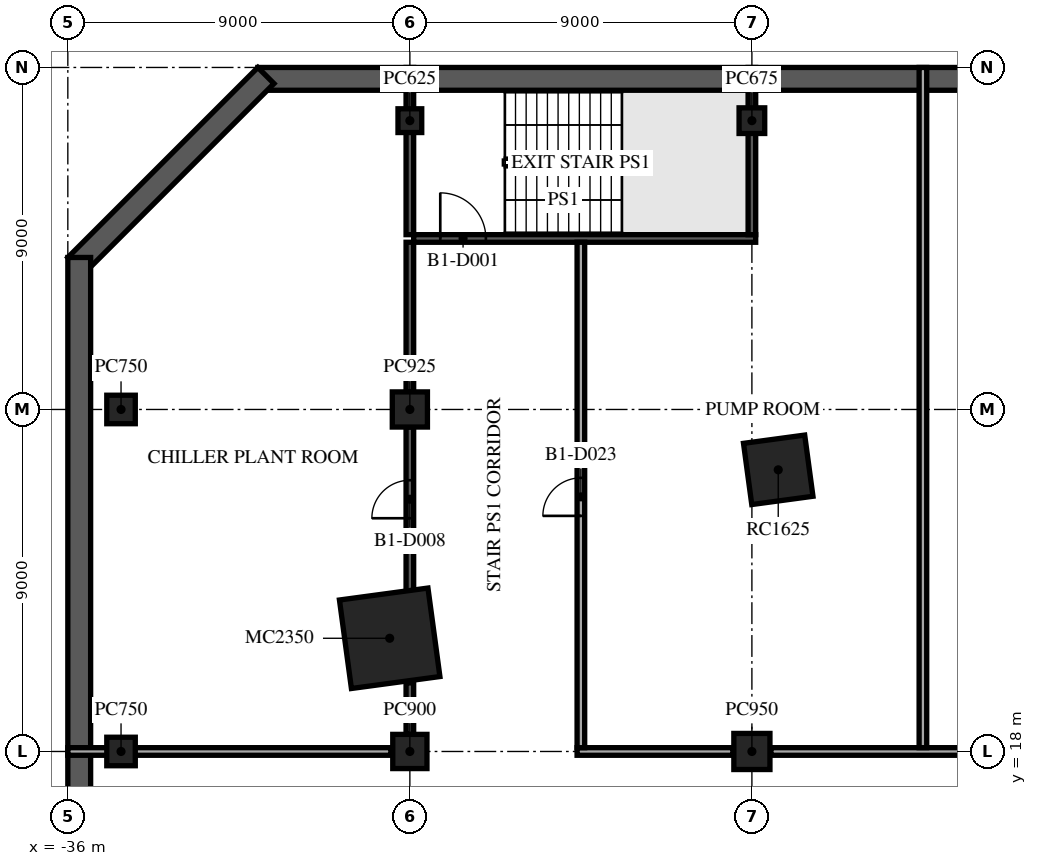
"""IFC4 building model, lengths in metres.
Left out: names, types, materials, properties, quantities, classifications, styles, units other than length and angle.
Written with IfcOpenShell. Run it as: python <this file> out.ifc"""

import sys

from ifc_helpers import new_model, si_unit, direction, frame, frame_2d, origin, origin_2d, place, context, subcontext, project, spatial, rectangle, extrude, element, fill, save


model = new_model("IFC4")
c1 = context("Model", 3, precision=1e-05, world=origin(), true_north=direction((0.0, 1.0)))
c2 = subcontext(c1, "Body", "Model", "MODEL_VIEW")
j1 = project(units=[si_unit("LENGTHUNIT", "METRE"), si_unit("PLANEANGLEUNIT", "RADIAN")], contexts=[c1])
p1 = place(None, origin())
s1 = spatial("IfcSite", under=j1, at=p1, CompositionType="ELEMENT")
p2 = place(p1, origin())
s2 = spatial("IfcBuilding", under=s1, at=p2, CompositionType="ELEMENT")
p3 = place(p2, frame((0.0, 0.0, -4.5)))
s3 = spatial("IfcBuildingStorey", under=s2, at=p3, CompositionType="ELEMENT", Elevation=-4.5)
p4 = place(p3, frame((31.0, 35.7, -0.3), z_axis=(0.0, 0.0, 1.0), x_axis=(-1.0, 0.0, 0.0)))
e1 = element("IfcWall", 1, at=p4, inside=s3, PredefinedType="SOLIDWALL", context=c2, shape_type="SweptSolid", body=[
    extrude(rectangle(XDim=62.0, YDim=0.6, at=frame_2d((31.0, 0.0))), origin(), (0.0, 0.0, 1.0), 4.4),
])
p5 = place(p3, frame((-30.788, 35.788, -0.3), z_axis=(0.0, 0.0, 1.0), x_axis=(-0.707106781187, -0.707106781187, 0.0)))
e2 = element("IfcWall", 2, at=p5, inside=s3, PredefinedType="SOLIDWALL", context=c2, shape_type="SweptSolid", body=[
    extrude(rectangle(XDim=7.071, YDim=0.6, at=frame_2d((3.536, 0.0))), origin(), (0.0, 0.0, 1.0), 4.4),
])
p6 = place(p3, frame((-35.7, 31.0, -0.3), z_axis=(0.0, 0.0, 1.0), x_axis=(0.0, -1.0, 0.0)))
e3 = element("IfcWall", 3, at=p6, inside=s3, PredefinedType="SOLIDWALL", context=c2, shape_type="SweptSolid", body=[
    extrude(rectangle(XDim=62.0, YDim=0.6, at=frame_2d((31.0, 0.0))), origin(), (0.0, 0.0, 1.0), 4.4),
])
for number, where, z_axis, x_axis in (
    (4, (-34.6, 18.0, 0.0), (0.0, 0.0, 1.0), (1.0, 0.0, 0.0)),
    (5, (-34.6, 27.0, 0.0), (0.0, 0.0, 1.0), (1.0, 0.0, 0.0)),
):
    element("IfcColumn", number, at=place(p3, frame(where, z_axis=z_axis, x_axis=x_axis)), inside=s3, PredefinedType="COLUMN", context=c2, shape_type="SweptSolid", body=[
        extrude(rectangle(XDim=0.75, YDim=0.75, at=origin_2d()), origin(), (0.0, 0.0, 1.0), 4.5),
    ])
p7 = place(p3, frame((-27.0, 18.0, 0.0), z_axis=(0.0, 0.0, 1.0), x_axis=(1.0, 0.0, 0.0)))
e6 = element("IfcColumn", 6, at=p7, inside=s3, PredefinedType="COLUMN", context=c2, shape_type="SweptSolid", body=[
    extrude(rectangle(XDim=0.9, YDim=0.9, at=origin_2d()), origin(), (0.0, 0.0, 1.0), 4.5),
])
p8 = place(p3, frame((-27.0, 27.0, 0.0), z_axis=(0.0, 0.0, 1.0), x_axis=(1.0, 0.0, 0.0)))
e7 = element("IfcColumn", 7, at=p8, inside=s3, PredefinedType="COLUMN", context=c2, shape_type="SweptSolid", body=[
    extrude(rectangle(XDim=0.925, YDim=0.925, at=origin_2d()), origin(), (0.0, 0.0, 1.0), 4.5),
])
p9 = place(p3, frame((-27.0, 34.6, 0.0), z_axis=(0.0, 0.0, 1.0), x_axis=(1.0, 0.0, 0.0)))
e8 = element("IfcColumn", 8, at=p9, inside=s3, PredefinedType="COLUMN", context=c2, shape_type="SweptSolid", body=[
    extrude(rectangle(XDim=0.625, YDim=0.625, at=origin_2d()), origin(), (0.0, 0.0, 1.0), 4.5),
])
p10 = place(p3, frame((-18.0, 18.0, 0.0), z_axis=(0.0, 0.0, 1.0), x_axis=(1.0, 0.0, 0.0)))
e9 = element("IfcColumn", 9, at=p10, inside=s3, PredefinedType="COLUMN", context=c2, shape_type="SweptSolid", body=[
    extrude(rectangle(XDim=0.95, YDim=0.95, at=origin_2d()), origin(), (0.0, 0.0, 1.0), 4.5),
])
p11 = place(p3, frame((-18.0, 34.6, 0.0), z_axis=(0.0, 0.0, 1.0), x_axis=(1.0, 0.0, 0.0)))
e10 = element("IfcColumn", 10, at=p11, inside=s3, PredefinedType="COLUMN", context=c2, shape_type="SweptSolid", body=[
    extrude(rectangle(XDim=0.675, YDim=0.675, at=origin_2d()), origin(), (0.0, 0.0, 1.0), 4.5),
])
p12 = place(p3, frame((-17.307, 25.412, 0.0), z_axis=(0.0, 0.0, 1.0), x_axis=(0.991001197216, 0.133853005627, 0.0)))
e11 = element("IfcColumn", 11, at=p12, inside=s3, PredefinedType="COLUMN", context=c2, shape_type="SweptSolid", body=[
    extrude(rectangle(XDim=1.625, YDim=1.625, at=origin_2d()), origin(), (0.0, 0.0, 1.0), 4.5),
])
p13 = place(p3, frame((-27.531, 20.979, 0.0), z_axis=(0.0, 0.0, 1.0), x_axis=(0.991001197216, 0.133853005627, 0.0)))
e12 = element("IfcColumn", 12, at=p13, inside=s3, PredefinedType="COLUMN", context=c2, shape_type="SweptSolid", body=[
    extrude(rectangle(XDim=2.35, YDim=2.35, at=origin_2d()), origin(), (0.0, 0.0, 1.0), 4.5),
])
p14 = place(p3, frame((-36.0, 18.0, 0.0), z_axis=(0.0, 0.0, 1.0), x_axis=(1.0, 0.0, 0.0)))
e13 = element("IfcWall", 13, at=p14, inside=s3, PredefinedType="PARTITIONING", context=c2, shape_type="SweptSolid", body=[
    extrude(rectangle(XDim=8.5, YDim=0.2, at=frame_2d((4.25, 0.0))), origin(), (0.0, 0.0, 1.0), 4.1),
])
p15 = place(p3, frame((-22.6, 18.0, 0.0), z_axis=(0.0, 0.0, 1.0), x_axis=(1.0, 0.0, 0.0)))
e14 = element("IfcWall", 14, at=p15, inside=s3, PredefinedType="PARTITIONING", context=c2, shape_type="SweptSolid", body=[
    extrude(rectangle(XDim=4.1, YDim=0.2, at=frame_2d((2.05, 0.0))), origin(), (0.0, 0.0, 1.0), 4.1),
])
p16 = place(p3, frame((-17.5, 18.0, 0.0), z_axis=(0.0, 0.0, 1.0), x_axis=(1.0, 0.0, 0.0)))
e15 = element("IfcWall", 15, at=p16, inside=s3, PredefinedType="PARTITIONING", context=c2, shape_type="SweptSolid", body=[
    extrude(rectangle(XDim=8.0, YDim=0.2, at=frame_2d((4.0, 0.0))), origin(), (0.0, 0.0, 1.0), 4.1),
])
p17 = place(p3, frame((-26.9, 31.5, 0.0), z_axis=(0.0, 0.0, 1.0), x_axis=(1.0, 0.0, 0.0)))
e16 = element("IfcWall", 16, at=p17, inside=s3, PredefinedType="PARTITIONING", context=c2, shape_type="SweptSolid", body=[
    extrude(rectangle(XDim=9.0, YDim=0.2, at=frame_2d((4.5, 0.0))), origin(), (0.0, 0.0, 1.0), 4.1),
])
p18 = place(p17, frame((0.7, 0.0, 0.0)))
e17 = element("IfcOpeningElement", 17, at=p18, cuts=e16, PredefinedType="OPENING", context=c2, shape_type="SweptSolid", body=[
    extrude(rectangle(XDim=1.2, YDim=2.1, at=frame_2d((0.6, 1.05))), frame((0.0, 0.11, 0.0), z_axis=(0.0, -1.0, 0.0), x_axis=(1.0, 0.0, 0.0)), (0.0, 0.0, 1.0), 0.22),
])
p19 = place(p3, frame((-27.0, 18.45, 0.0), z_axis=(0.0, 0.0, 1.0), x_axis=(0.0, 1.0, 0.0)))
e18 = element("IfcWall", 18, at=p19, inside=s3, PredefinedType="PARTITIONING", context=c2, shape_type="SweptSolid", body=[
    extrude(rectangle(XDim=1.354, YDim=0.2, at=frame_2d((0.677, 0.0))), origin(), (0.0, 0.0, 1.0), 4.1),
])
p20 = place(p3, frame((-27.0, 22.154, 0.0), z_axis=(0.0, 0.0, 1.0), x_axis=(0.0, 1.0, 0.0)))
e19 = element("IfcWall", 19, at=p20, inside=s3, PredefinedType="PARTITIONING", context=c2, shape_type="SweptSolid", body=[
    extrude(rectangle(XDim=4.384, YDim=0.2, at=frame_2d((2.192, 0.0))), origin(), (0.0, 0.0, 1.0), 4.1),
])
p21 = place(p20, frame((1.984, 0.0, 0.0)))
e20 = element("IfcOpeningElement", 20, at=p21, cuts=e19, PredefinedType="OPENING", context=c2, shape_type="SweptSolid", body=[
    extrude(rectangle(XDim=1.0, YDim=2.1, at=frame_2d((0.5, 1.05))), frame((0.0, 0.11, 0.0), z_axis=(0.0, -1.0, 0.0), x_axis=(1.0, 0.0, 0.0)), (0.0, 0.0, 1.0), 0.22),
])
p22 = place(p3, frame((-27.0, 27.462, 0.0), z_axis=(0.0, 0.0, 1.0), x_axis=(0.0, 1.0, 0.0)))
e21 = element("IfcWall", 21, at=p22, inside=s3, PredefinedType="PARTITIONING", context=c2, shape_type="SweptSolid", body=[
    extrude(rectangle(XDim=3.938, YDim=0.2, at=frame_2d((1.969, 0.0))), origin(), (0.0, 0.0, 1.0), 4.1),
])
p23 = place(p3, frame((-27.0, 31.6, 0.0), z_axis=(0.0, 0.0, 1.0), x_axis=(0.0, 1.0, 0.0)))
e22 = element("IfcWall", 22, at=p23, inside=s3, PredefinedType="PARTITIONING", context=c2, shape_type="SweptSolid", body=[
    extrude(rectangle(XDim=4.4, YDim=0.2, at=frame_2d((2.2, 0.0))), origin(), (0.0, 0.0, 1.0), 4.1),
])
p24 = place(p3, frame((-22.5, 18.1, 0.0), z_axis=(0.0, 0.0, 1.0), x_axis=(0.0, 1.0, 0.0)))
e23 = element("IfcWall", 23, at=p24, inside=s3, PredefinedType="PARTITIONING", context=c2, shape_type="SweptSolid", body=[
    extrude(rectangle(XDim=13.3, YDim=0.2, at=frame_2d((6.65, 0.0))), origin(), (0.0, 0.0, 1.0), 4.1),
])
p25 = place(p24, frame((6.1, 0.0, 0.0)))
e24 = element("IfcOpeningElement", 24, at=p25, cuts=e23, PredefinedType="OPENING", context=c2, shape_type="SweptSolid", body=[
    extrude(rectangle(XDim=1.0, YDim=2.1, at=frame_2d((0.5, 1.05))), frame((0.0, 0.11, 0.0), z_axis=(0.0, -1.0, 0.0), x_axis=(1.0, 0.0, 0.0)), (0.0, 0.0, 1.0), 0.22),
])
p26 = place(p3, frame((-18.0, 31.6, 0.0), z_axis=(0.0, 0.0, 1.0), x_axis=(0.0, 1.0, 0.0)))
e25 = element("IfcWall", 25, at=p26, inside=s3, PredefinedType="PARTITIONING", context=c2, shape_type="SweptSolid", body=[
    extrude(rectangle(XDim=4.4, YDim=0.2, at=frame_2d((2.2, 0.0))), origin(), (0.0, 0.0, 1.0), 4.1),
])
p27 = place(p3, frame((-13.5, 18.1, 0.0), z_axis=(0.0, 0.0, 1.0), x_axis=(0.0, 1.0, 0.0)))
e26 = element("IfcWall", 26, at=p27, inside=s3, PredefinedType="PARTITIONING", context=c2, shape_type="SweptSolid", body=[
    extrude(rectangle(XDim=17.9, YDim=0.2, at=frame_2d((8.95, 0.0))), origin(), (0.0, 0.0, 1.0), 4.1),
])
p28 = place(p18, origin())
e27 = element("IfcDoor", 27, at=p28, inside=s3, OperationType="SINGLE_SWING_LEFT", PredefinedType="DOOR", context=c2, shape_type="SweptSolid", body=[
    extrude(rectangle(XDim=1.2, YDim=2.1, at=frame_2d((0.6, 1.05))), frame((0.0, 0.025, 0.0), z_axis=(0.0, -1.0, 0.0), x_axis=(1.0, 0.0, 0.0)), (0.0, 0.0, 1.0), 0.05),
])
fill(e17, e27)
p29 = place(p21, origin())
e28 = element("IfcDoor", 28, at=p29, inside=s3, OperationType="SINGLE_SWING_RIGHT", PredefinedType="DOOR", context=c2, shape_type="SweptSolid", body=[
    extrude(rectangle(XDim=1.0, YDim=2.1, at=frame_2d((0.5, 1.05))), frame((0.0, 0.025, 0.0), z_axis=(0.0, -1.0, 0.0), x_axis=(1.0, 0.0, 0.0)), (0.0, 0.0, 1.0), 0.05),
])
fill(e20, e28)
p30 = place(p25, origin())
e29 = element("IfcDoor", 29, at=p30, inside=s3, OperationType="SINGLE_SWING_LEFT", PredefinedType="DOOR", context=c2, shape_type="SweptSolid", body=[
    extrude(rectangle(XDim=1.0, YDim=2.1, at=frame_2d((0.5, 1.05))), frame((0.0, 0.025, 0.0), z_axis=(0.0, -1.0, 0.0), x_axis=(1.0, 0.0, 0.0)), (0.0, 0.0, 1.0), 0.05),
])
fill(e24, e29)
save(model, sys.argv[1])
